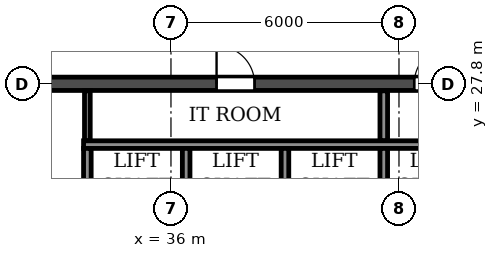
"""IFC4 building model, lengths in metres.
Left out: names, types, materials, properties, quantities, classifications, styles, units other than length and angle.
Written with IfcOpenShell. Run it as: python <this file> out.ifc"""

import sys

from ifc_helpers import new_model, si_unit, direction, frame, frame_2d, origin, place, context, subcontext, project, spatial, rectangle, extrude, element, fill, save


model = new_model("IFC4")
c1 = context("Model", 3, precision=1e-05, world=origin(), true_north=direction((0.0, 1.0)))
c2 = subcontext(c1, "Body", "Model", "MODEL_VIEW")
j1 = project(units=[si_unit("LENGTHUNIT", "METRE"), si_unit("PLANEANGLEUNIT", "RADIAN")], contexts=[c1])
p1 = place(None, origin())
s1 = spatial("IfcSite", under=j1, at=p1, CompositionType="ELEMENT")
p2 = place(p1, origin())
s2 = spatial("IfcBuilding", under=s1, at=p2, CompositionType="ELEMENT")
p3 = place(p2, frame((0.0, 0.0, 257.7)))
s3 = spatial("IfcBuildingStorey", under=s2, at=p3, CompositionType="ELEMENT", Elevation=257.7)
p4 = place(p3, frame((18.2, 27.8, 0.0), z_axis=(0.0, 0.0, 1.0), x_axis=(1.0, 0.0, 0.0)))
e1 = element("IfcWall", 1, at=p4, inside=s3, PredefinedType="SOLIDWALL", context=c2, shape_type="SweptSolid", body=[
    extrude(rectangle(XDim=65.6, YDim=0.35, at=frame_2d((32.8, 0.0))), origin(), (0.0, 0.0, 1.0), 3.0),
])
p5 = place(p4, frame((0.7, 0.0, 0.0)))
e2 = element("IfcOpeningElement", 2, at=p5, cuts=e1, PredefinedType="OPENING", context=c2, shape_type="SweptSolid", body=[
    extrude(rectangle(XDim=1.0, YDim=2.1, at=frame_2d((0.5, 1.05))), frame((0.0, 0.185, 0.0), z_axis=(0.0, -1.0, 0.0), x_axis=(1.0, 0.0, 0.0)), (0.0, 0.0, 1.0), 0.37),
])
p6 = place(p4, frame((4.05, 0.0, 0.0)))
e3 = element("IfcOpeningElement", 3, at=p6, cuts=e1, PredefinedType="OPENING", context=c2, shape_type="SweptSolid", body=[
    extrude(rectangle(XDim=0.9, YDim=2.1, at=frame_2d((0.45, 1.05))), frame((0.0, 0.185, 0.0), z_axis=(0.0, -1.0, 0.0), x_axis=(1.0, 0.0, 0.0)), (0.0, 0.0, 1.0), 0.37),
])
p7 = place(p4, frame((13.25, 0.0, 0.0)))
e4 = element("IfcOpeningElement", 4, at=p7, cuts=e1, PredefinedType="OPENING", context=c2, shape_type="SweptSolid", body=[
    extrude(rectangle(XDim=0.9, YDim=2.1, at=frame_2d((0.45, 1.05))), frame((0.0, 0.185, 0.0), z_axis=(0.0, -1.0, 0.0), x_axis=(1.0, 0.0, 0.0)), (0.0, 0.0, 1.0), 0.37),
])
p8 = place(p4, frame((19.0, 0.0, 0.0)))
e5 = element("IfcOpeningElement", 5, at=p8, cuts=e1, PredefinedType="OPENING", context=c2, shape_type="SweptSolid", body=[
    extrude(rectangle(XDim=1.0, YDim=2.1, at=frame_2d((0.5, 1.05))), frame((0.0, 0.185, 0.0), z_axis=(0.0, -1.0, 0.0), x_axis=(1.0, 0.0, 0.0)), (0.0, 0.0, 1.0), 0.37),
])
p9 = place(p4, frame((24.2, 0.0, 0.0)))
e6 = element("IfcOpeningElement", 6, at=p9, cuts=e1, PredefinedType="OPENING", context=c2, shape_type="SweptSolid", body=[
    extrude(rectangle(XDim=1.0, YDim=2.1, at=frame_2d((0.5, 1.05))), frame((0.0, 0.185, 0.0), z_axis=(0.0, -1.0, 0.0), x_axis=(1.0, 0.0, 0.0)), (0.0, 0.0, 1.0), 0.37),
])
p10 = place(p4, frame((29.4, 0.0, 0.0)))
e7 = element("IfcOpeningElement", 7, at=p10, cuts=e1, PredefinedType="OPENING", context=c2, shape_type="SweptSolid", body=[
    extrude(rectangle(XDim=1.0, YDim=2.1, at=frame_2d((0.5, 1.05))), frame((0.0, 0.185, 0.0), z_axis=(0.0, -1.0, 0.0), x_axis=(1.0, 0.0, 0.0)), (0.0, 0.0, 1.0), 0.37),
])
p11 = place(p4, frame((32.3, 0.0, 0.0)))
e8 = element("IfcOpeningElement", 8, at=p11, cuts=e1, PredefinedType="OPENING", context=c2, shape_type="SweptSolid", body=[
    extrude(rectangle(XDim=1.0, YDim=2.1, at=frame_2d((0.5, 1.05))), frame((0.0, 0.185, 0.0), z_axis=(0.0, -1.0, 0.0), x_axis=(1.0, 0.0, 0.0)), (0.0, 0.0, 1.0), 0.37),
])
p12 = place(p4, frame((36.5, 0.0, 0.0)))
e9 = element("IfcOpeningElement", 9, at=p12, cuts=e1, PredefinedType="OPENING", context=c2, shape_type="SweptSolid", body=[
    extrude(rectangle(XDim=1.0, YDim=2.1, at=frame_2d((0.5, 1.05))), frame((0.0, 0.185, 0.0), z_axis=(0.0, -1.0, 0.0), x_axis=(1.0, 0.0, 0.0)), (0.0, 0.0, 1.0), 0.37),
])
p13 = place(p4, frame((40.4, 0.0, 0.0)))
e10 = element("IfcOpeningElement", 10, at=p13, cuts=e1, PredefinedType="OPENING", context=c2, shape_type="SweptSolid", body=[
    extrude(rectangle(XDim=1.0, YDim=2.1, at=frame_2d((0.5, 1.05))), frame((0.0, 0.185, 0.0), z_axis=(0.0, -1.0, 0.0), x_axis=(1.0, 0.0, 0.0)), (0.0, 0.0, 1.0), 0.37),
])
p14 = place(p4, frame((43.0, 0.0, 0.0)))
e11 = element("IfcOpeningElement", 11, at=p14, cuts=e1, PredefinedType="OPENING", context=c2, shape_type="SweptSolid", body=[
    extrude(rectangle(XDim=1.0, YDim=2.1, at=frame_2d((0.5, 1.05))), frame((0.0, 0.185, 0.0), z_axis=(0.0, -1.0, 0.0), x_axis=(1.0, 0.0, 0.0)), (0.0, 0.0, 1.0), 0.37),
])
p15 = place(p4, frame((46.65, 0.0, 0.0)))
e12 = element("IfcOpeningElement", 12, at=p15, cuts=e1, PredefinedType="OPENING", context=c2, shape_type="SweptSolid", body=[
    extrude(rectangle(XDim=1.5, YDim=2.1, at=frame_2d((0.75, 1.05))), frame((0.0, 0.185, 0.0), z_axis=(0.0, -1.0, 0.0), x_axis=(1.0, 0.0, 0.0)), (0.0, 0.0, 1.0), 0.37),
])
p16 = place(p4, frame((51.45, 0.0, 0.0)))
e13 = element("IfcOpeningElement", 13, at=p16, cuts=e1, PredefinedType="OPENING", context=c2, shape_type="SweptSolid", body=[
    extrude(rectangle(XDim=0.9, YDim=2.1, at=frame_2d((0.45, 1.05))), frame((0.0, 0.185, 0.0), z_axis=(0.0, -1.0, 0.0), x_axis=(1.0, 0.0, 0.0)), (0.0, 0.0, 1.0), 0.37),
])
p17 = place(p4, frame((60.65, 0.0, 0.0)))
e14 = element("IfcOpeningElement", 14, at=p17, cuts=e1, PredefinedType="OPENING", context=c2, shape_type="SweptSolid", body=[
    extrude(rectangle(XDim=0.9, YDim=2.1, at=frame_2d((0.45, 1.05))), frame((0.0, 0.185, 0.0), z_axis=(0.0, -1.0, 0.0), x_axis=(1.0, 0.0, 0.0)), (0.0, 0.0, 1.0), 0.37),
])
p18 = place(p4, frame((63.9, 0.0, 0.0)))
e15 = element("IfcOpeningElement", 15, at=p18, cuts=e1, PredefinedType="OPENING", context=c2, shape_type="SweptSolid", body=[
    extrude(rectangle(XDim=1.0, YDim=2.1, at=frame_2d((0.5, 1.05))), frame((0.0, 0.185, 0.0), z_axis=(0.0, -1.0, 0.0), x_axis=(1.0, 0.0, 0.0)), (0.0, 0.0, 1.0), 0.37),
])
p19 = place(p3, frame((41.6, 26.3, 0.0), z_axis=(0.0, 0.0, 1.0), x_axis=(0.0, 1.0, 0.0)))
e16 = element("IfcWall", 16, at=p19, inside=s3, PredefinedType="PARTITIONING", context=c2, shape_type="SweptSolid", body=[
    extrude(rectangle(XDim=1.315, YDim=0.2, at=frame_2d((0.657, 0.0))), origin(), (0.0, 0.0, 1.0), 3.0),
])
p20 = place(p3, frame((33.8, 26.3, 0.0), z_axis=(0.0, 0.0, 1.0), x_axis=(0.0, 1.0, 0.0)))
e17 = element("IfcWall", 17, at=p20, inside=s3, PredefinedType="PARTITIONING", context=c2, shape_type="SweptSolid", body=[
    extrude(rectangle(XDim=1.315, YDim=0.15, at=frame_2d((0.657, 0.0))), origin(), (0.0, 0.0, 1.0), 3.0),
])
p21 = place(p3, frame((33.7, 26.2, 0.0), z_axis=(0.0, 0.0, 1.0), x_axis=(1.0, 0.0, 0.0)))
e18 = element("IfcWall", 18, at=p21, inside=s3, PredefinedType="PARTITIONING", context=c2, shape_type="SweptSolid", body=[
    extrude(rectangle(XDim=10.4, YDim=0.2, at=frame_2d((5.2, 0.0))), origin(), (0.0, 0.0, 1.0), 3.0),
])
p22 = place(p3, frame((33.8, 23.4, 0.0), z_axis=(0.0, 0.0, 1.0), x_axis=(0.0, 1.0, 0.0)))
e19 = element("IfcWall", 19, at=p22, inside=s3, PredefinedType="PARTITIONING", context=c2, shape_type="SweptSolid", body=[
    extrude(rectangle(XDim=2.7, YDim=0.2, at=frame_2d((1.35, 0.0))), origin(), (0.0, 0.0, 1.0), 3.0),
])
for number, where, z_axis, x_axis in (
    (20, (36.4, 23.585, 0.0), (0.0, 0.0, 1.0), (0.0, 1.0, 0.0)),
    (21, (39.0, 23.585, 0.0), (0.0, 0.0, 1.0), (0.0, 1.0, 0.0)),
    (22, (41.6, 23.585, 0.0), (0.0, 0.0, 1.0), (0.0, 1.0, 0.0)),
):
    element("IfcWall", number, at=place(p3, frame(where, z_axis=z_axis, x_axis=x_axis)), inside=s3, PredefinedType="PARTITIONING", context=c2, shape_type="SweptSolid", body=[
        extrude(rectangle(XDim=2.515, YDim=0.2, at=frame_2d((1.258, 0.0))), origin(), (0.0, 0.0, 1.0), 3.0),
    ])
p23 = place(p8, origin())
e23 = element("IfcDoor", 23, at=p23, inside=s3, OperationType="SINGLE_SWING_LEFT", PredefinedType="DOOR", context=c2, shape_type="SweptSolid", body=[
    extrude(rectangle(XDim=1.0, YDim=2.1, at=frame_2d((0.5, 1.05))), frame((0.0, 0.025, 0.0), z_axis=(0.0, -1.0, 0.0), x_axis=(1.0, 0.0, 0.0)), (0.0, 0.0, 1.0), 0.05),
])
fill(e5, e23)
p24 = place(p9, origin())
e24 = element("IfcDoor", 24, at=p24, inside=s3, OperationType="SINGLE_SWING_RIGHT", PredefinedType="DOOR", context=c2, shape_type="SweptSolid", body=[
    extrude(rectangle(XDim=1.0, YDim=2.1, at=frame_2d((0.5, 1.05))), frame((0.0, 0.025, 0.0), z_axis=(0.0, -1.0, 0.0), x_axis=(1.0, 0.0, 0.0)), (0.0, 0.0, 1.0), 0.05),
])
fill(e6, e24)
save(model, sys.argv[1])
